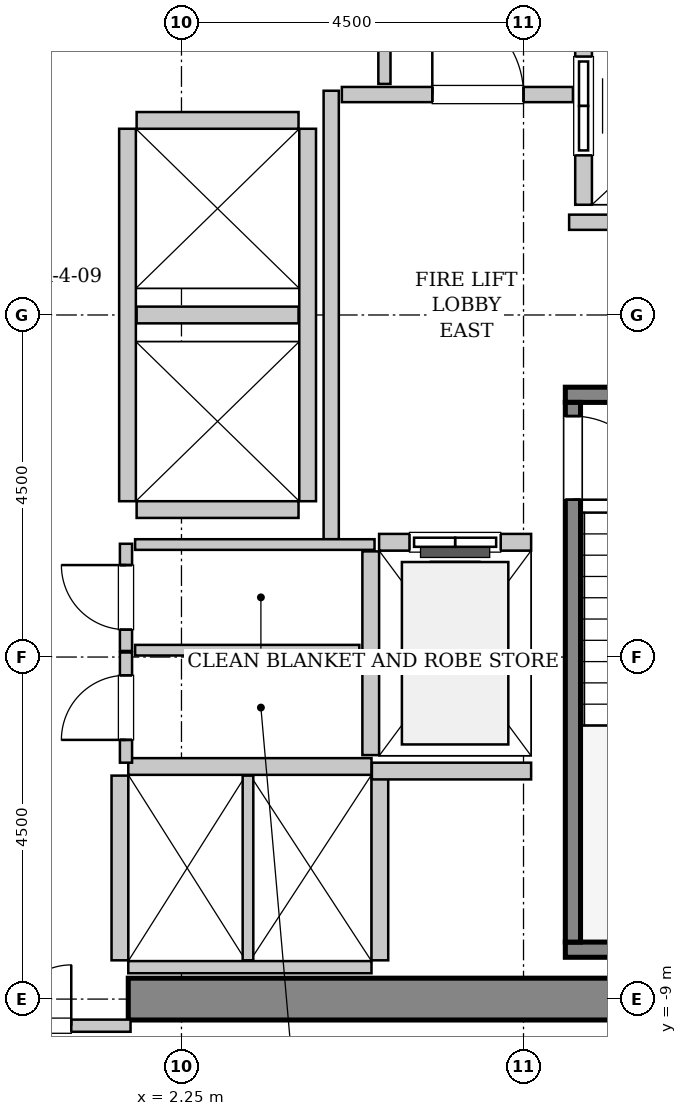
"""IFC4 building model, lengths in metres.
Left out: names, types, materials, properties, quantities, classifications, styles, units other than length and angle.
Written with IfcOpenShell. Run it as: python <this file> out.ifc"""

import sys

from ifc_helpers import new_model, si_unit, direction, frame, frame_2d, origin, place, context, subcontext, project, spatial, rectangle, extrude, source, transform, mapped, element, fill, save


model = new_model("IFC4")
c1 = context("Model", 3, precision=1e-05, world=origin(), true_north=direction((0.0, 1.0)))
c2 = subcontext(c1, "Body", "Model", "MODEL_VIEW")
j1 = project(units=[si_unit("LENGTHUNIT", "METRE"), si_unit("PLANEANGLEUNIT", "RADIAN")], contexts=[c1])
p1 = place(None, origin())
s1 = spatial("IfcSite", under=j1, at=p1, CompositionType="ELEMENT")
p2 = place(p1, origin())
s2 = spatial("IfcBuilding", under=s1, at=p2, CompositionType="ELEMENT")
p3 = place(p2, frame((0.0, 0.0, 121.2)))
s3 = spatial("IfcBuildingStorey", under=s2, at=p3, CompositionType="ELEMENT", Elevation=121.2)
m1 = source(origin(), c2, "Body", "SweptSolid", [
    extrude(rectangle(XDim=9.975, YDim=0.55, at=frame_2d((4.987, 0.0))), origin(), (0.0, 0.0, 1.0), 3.8),
])
p4 = place(p3, frame((1.55, -9.0, 0.0), z_axis=(0.0, 0.0, 1.0), x_axis=(1.0, 0.0, 0.0)))
e1 = element("IfcWall", 1, at=p4, inside=s3, PredefinedType="SHEAR", context=c2, shape_type="MappedRepresentation", body=[
    mapped(m1, transform((0.0, 0.0, 0.0), x_axis=(1.0, 0.0, 0.0), y_axis=(0.0, 1.0, 0.0), z_axis=(0.0, 0.0, 1.0), scale=1.0)),
])
m2 = source(origin(), c2, "Body", "SweptSolid", [
    extrude(rectangle(XDim=3.4, YDim=0.2, at=frame_2d((1.7, 0.0))), origin(), (0.0, 0.0, 1.0), 3.8),
])
p5 = place(p3, frame((7.3, -1.05, 0.0), z_axis=(0.0, 0.0, 1.0), x_axis=(1.0, 0.0, 0.0)))
e2 = element("IfcWall", 2, at=p5, inside=s3, PredefinedType="SOLIDWALL", context=c2, shape_type="MappedRepresentation", body=[
    mapped(m2, transform((0.0, 0.0, 0.0), x_axis=(1.0, 0.0, 0.0), y_axis=(0.0, 1.0, 0.0), z_axis=(0.0, 0.0, 1.0), scale=1.0)),
])
m3 = source(origin(), c2, "Body", "SweptSolid", [
    extrude(rectangle(XDim=3.68, YDim=0.2, at=frame_2d((1.84, 0.0))), origin(), (0.0, 0.0, 1.0), 3.8),
])
p6 = place(p3, frame((7.3, -8.35, 0.0), z_axis=(0.0, 0.0, 1.0), x_axis=(1.0, 0.0, 0.0)))
e3 = element("IfcWall", 3, at=p6, inside=s3, PredefinedType="SOLIDWALL", context=c2, shape_type="MappedRepresentation", body=[
    mapped(m3, transform((0.0, 0.0, 0.0), x_axis=(1.0, 0.0, 0.0), y_axis=(0.0, 1.0, 0.0), z_axis=(0.0, 0.0, 1.0), scale=1.0)),
])
m4 = source(origin(), c2, "Body", "SweptSolid", [
    extrude(rectangle(XDim=7.1, YDim=0.2, at=frame_2d((3.55, 0.0))), origin(), (0.0, 0.0, 1.0), 3.8),
])
p7 = place(p3, frame((7.4, -1.15, 0.0), z_axis=(0.0, 0.0, 1.0), x_axis=(0.0, -1.0, 0.0)))
e4 = element("IfcWall", 4, at=p7, inside=s3, PredefinedType="SOLIDWALL", context=c2, shape_type="MappedRepresentation", body=[
    mapped(m4, transform((0.0, 0.0, 0.0), x_axis=(1.0, 0.0, 0.0), y_axis=(0.0, 1.0, 0.0), z_axis=(0.0, 0.0, 1.0), scale=1.0)),
])
p8 = place(p7, frame((0.18, 0.0, 0.0)))
e5 = element("IfcOpeningElement", 5, at=p8, cuts=e4, PredefinedType="OPENING", context=c2, shape_type="SweptSolid", body=[
    extrude(rectangle(XDim=1.1, YDim=2.15, at=frame_2d((0.55, 1.075))), frame((0.0, 0.11, 0.0), z_axis=(0.0, -1.0, 0.0), x_axis=(1.0, 0.0, 0.0)), (0.0, 0.0, 1.0), 0.22),
])
m5 = source(origin(), c2, "Body", "SweptSolid", [
    extrude(rectangle(XDim=2.0, YDim=0.22, at=frame_2d((1.0, 0.0))), origin(), (0.0, 0.0, 1.0), 3.535),
])
p9 = place(p3, frame((6.85, -2.99, 0.0), z_axis=(0.0, 0.0, 1.0), x_axis=(-1.0, 0.0, 0.0)))
e6 = element("IfcWall", 6, at=p9, inside=s3, PredefinedType="SOLIDWALL", context=c2, shape_type="MappedRepresentation", body=[
    mapped(m5, transform((0.0, 0.0, 0.0), x_axis=(1.0, 0.0, 0.0), y_axis=(0.0, 1.0, 0.0), z_axis=(0.0, 0.0, 1.0), scale=1.0)),
])
p10 = place(p9, frame((0.4, 0.0, 0.0)))
e7 = element("IfcOpeningElement", 7, at=p10, cuts=e6, PredefinedType="OPENING", context=c2, shape_type="SweptSolid", body=[
    extrude(rectangle(XDim=1.2, YDim=2.2, at=frame_2d((0.6, 1.1))), frame((0.0, 0.12, 0.0), z_axis=(0.0, -1.0, 0.0), x_axis=(1.0, 0.0, 0.0)), (0.0, 0.0, 1.0), 0.24),
])
m6 = source(origin(), c2, "Body", "SweptSolid", [
    extrude(rectangle(XDim=2.68, YDim=0.22, at=frame_2d((1.34, 0.0))), origin(), (0.0, 0.0, 1.0), 3.535),
])
p11 = place(p3, frame((4.74, -3.11, 0.0), z_axis=(0.0, 0.0, 1.0), x_axis=(0.0, -1.0, 0.0)))
e8 = element("IfcWall", 8, at=p11, inside=s3, PredefinedType="SOLIDWALL", context=c2, shape_type="MappedRepresentation", body=[
    mapped(m6, transform((0.0, 0.0, 0.0), x_axis=(1.0, 0.0, 0.0), y_axis=(0.0, 1.0, 0.0), z_axis=(0.0, 0.0, 1.0), scale=1.0)),
])
m7 = source(origin(), c2, "Body", "SweptSolid", [
    extrude(rectangle(XDim=5.45, YDim=0.22, at=frame_2d((2.725, 0.0))), origin(), (0.0, 0.0, 1.0), 3.535),
])
p12 = place(p3, frame((7.54, 6.9, 0.0), z_axis=(0.0, 0.0, 1.0), x_axis=(0.0, -1.0, 0.0)))
e9 = element("IfcWall", 9, at=p12, inside=s3, PredefinedType="SOLIDWALL", context=c2, shape_type="MappedRepresentation", body=[
    mapped(m7, transform((0.0, 0.0, 0.0), x_axis=(1.0, 0.0, 0.0), y_axis=(0.0, 1.0, 0.0), z_axis=(0.0, 0.0, 1.0), scale=1.0)),
])
p13 = place(p12, frame((3.5, 0.0, 0.0)))
e10 = element("IfcOpeningElement", 10, at=p13, cuts=e9, PredefinedType="OPENING", context=c2, shape_type="SweptSolid", body=[
    extrude(rectangle(XDim=1.3, YDim=2.3, at=frame_2d((0.65, 1.15))), frame((0.0, 0.12, 0.0), z_axis=(0.0, -1.0, 0.0), x_axis=(1.0, 0.0, 0.0)), (0.0, 0.0, 1.0), 0.24),
])
p14 = place(p12, frame((0.65, 0.0, 0.0)))
e11 = element("IfcOpeningElement", 11, at=p14, cuts=e9, PredefinedType="OPENING", context=c2, shape_type="SweptSolid", body=[
    extrude(rectangle(XDim=1.3, YDim=2.3, at=frame_2d((0.65, 1.15))), frame((0.0, 0.12, 0.0), z_axis=(0.0, -1.0, 0.0), x_axis=(1.0, 0.0, 0.0)), (0.0, 0.0, 1.0), 0.24),
])
m8 = source(origin(), c2, "Body", "SweptSolid", [
    extrude(rectangle(XDim=3.2, YDim=0.22, at=frame_2d((1.6, 0.0))), origin(), (0.0, 0.0, 1.0), 3.535),
])
p15 = place(p3, frame((4.75, -5.94, 0.0), z_axis=(0.0, 0.0, 1.0), x_axis=(-1.0, 0.0, 0.0)))
e12 = element("IfcWall", 12, at=p15, inside=s3, PredefinedType="SOLIDWALL", context=c2, shape_type="MappedRepresentation", body=[
    mapped(m8, transform((0.0, 0.0, 0.0), x_axis=(1.0, 0.0, 0.0), y_axis=(0.0, 1.0, 0.0), z_axis=(0.0, 0.0, 1.0), scale=1.0)),
])
m9 = source(origin(), c2, "Body", "SweptSolid", [
    extrude(rectangle(XDim=3.2, YDim=0.16, at=frame_2d((1.6, 0.0))), origin(), (0.0, 0.0, 1.0), 2.425),
])
p16 = place(p3, frame((1.55, -8.58, 0.0), z_axis=(0.0, 0.0, 1.0), x_axis=(1.0, 0.0, 0.0)))
e13 = element("IfcWall", 13, at=p16, inside=s3, PredefinedType="PARTITIONING", context=c2, shape_type="MappedRepresentation", body=[
    mapped(m9, transform((0.0, 0.0, 0.0), x_axis=(1.0, 0.0, 0.0), y_axis=(0.0, 1.0, 0.0), z_axis=(0.0, 0.0, 1.0), scale=1.0)),
])
m10 = source(origin(), c2, "Body", "SweptSolid", [
    extrude(rectangle(XDim=2.43, YDim=0.22, at=frame_2d((1.215, 0.0))), origin(), (0.0, 0.0, 1.0), 3.535),
])
p17 = place(p3, frame((1.44, -6.06, 0.0), z_axis=(0.0, 0.0, 1.0), x_axis=(0.0, -1.0, 0.0)))
e14 = element("IfcWall", 14, at=p17, inside=s3, PredefinedType="SOLIDWALL", context=c2, shape_type="MappedRepresentation", body=[
    mapped(m10, transform((0.0, 0.0, 0.0), x_axis=(1.0, 0.0, 0.0), y_axis=(0.0, 1.0, 0.0), z_axis=(0.0, 0.0, 1.0), scale=1.0)),
])
m11 = source(origin(), c2, "Body", "SweptSolid", [
    extrude(rectangle(XDim=2.43, YDim=0.14, at=frame_2d((1.215, 0.0))), origin(), (0.0, 0.0, 1.0), 3.535),
])
p18 = place(p3, frame((3.125, -8.49, 0.0), z_axis=(0.0, 0.0, 1.0), x_axis=(0.0, 1.0, 0.0)))
e15 = element("IfcWall", 15, at=p18, inside=s3, PredefinedType="PARTITIONING", context=c2, shape_type="MappedRepresentation", body=[
    mapped(m11, transform((0.0, 0.0, 0.0), x_axis=(1.0, 0.0, 0.0), y_axis=(0.0, 1.0, 0.0), z_axis=(0.0, 0.0, 1.0), scale=1.0)),
])
p19 = place(p3, frame((4.86, -8.49, 0.0), z_axis=(0.0, 0.0, 1.0), x_axis=(0.0, 1.0, 0.0)))
e16 = element("IfcWall", 16, at=p19, inside=s3, PredefinedType="SOLIDWALL", context=c2, shape_type="MappedRepresentation", body=[
    mapped(m10, transform((0.0, 0.0, 0.0), x_axis=(1.0, 0.0, 0.0), y_axis=(0.0, 1.0, 0.0), z_axis=(0.0, 0.0, 1.0), scale=1.0)),
])
m12 = source(origin(), c2, "Body", "SweptSolid", [
    extrude(rectangle(XDim=4.9, YDim=0.22, at=frame_2d((2.45, 0.0))), origin(), (0.0, 0.0, 1.0), 3.535),
])
for number, where, z_axis, x_axis in (
    (17, (1.54, 2.45, 0.0), (0.0, 0.0, 1.0), (0.0, -1.0, 0.0)),
    (18, (3.91, -2.45, 0.0), (0.0, 0.0, 1.0), (0.0, 1.0, 0.0)),
):
    element("IfcWall", number, at=place(p3, frame(where, z_axis=z_axis, x_axis=x_axis)), inside=s3, PredefinedType="SOLIDWALL", context=c2, shape_type="MappedRepresentation", body=[
        mapped(m12, transform((0.0, 0.0, 0.0), x_axis=(1.0, 0.0, 0.0), y_axis=(0.0, 1.0, 0.0), z_axis=(0.0, 0.0, 1.0), scale=1.0)),
    ])
m13 = source(origin(), c2, "Body", "SweptSolid", [
    extrude(rectangle(XDim=2.13, YDim=0.22, at=frame_2d((1.065, 0.0))), origin(), (0.0, 0.0, 1.0), 3.535),
])
for number, where, z_axis, x_axis in (
    (19, (1.66, -2.56, 0.0), (0.0, 0.0, 1.0), (1.0, 0.0, 0.0)),
    (20, (1.66, 0.0, 0.0), (0.0, 0.0, 1.0), (1.0, 0.0, 0.0)),
    (21, (3.79, 2.56, 0.0), (0.0, 0.0, 1.0), (-1.0, 0.0, 0.0)),
):
    element("IfcWall", number, at=place(p3, frame(where, z_axis=z_axis, x_axis=x_axis)), inside=s3, PredefinedType="SOLIDWALL", context=c2, shape_type="MappedRepresentation", body=[
        mapped(m13, transform((0.0, 0.0, 0.0), x_axis=(1.0, 0.0, 0.0), y_axis=(0.0, 1.0, 0.0), z_axis=(0.0, 0.0, 1.0), scale=1.0)),
    ])
m14 = source(origin(), c2, "Body", "SweptSolid", [
    extrude(rectangle(XDim=2.095, YDim=0.22, at=frame_2d((1.048, 0.0))), origin(), (0.0, 0.0, 1.0), 3.535),
])
p20 = place(p3, frame((4.755, -6.0, 0.0), z_axis=(0.0, 0.0, 1.0), x_axis=(1.0, 0.0, 0.0)))
e22 = element("IfcWall", 22, at=p20, inside=s3, PredefinedType="SOLIDWALL", context=c2, shape_type="MappedRepresentation", body=[
    mapped(m14, transform((0.0, 0.0, 0.0), x_axis=(1.0, 0.0, 0.0), y_axis=(0.0, 1.0, 0.0), z_axis=(0.0, 0.0, 1.0), scale=1.0)),
])
m15 = source(origin(), c2, "Body", "SweptSolid", [
    extrude(rectangle(XDim=5.9, YDim=0.2, at=frame_2d((2.95, 0.0))), origin(), (0.0, 0.0, 1.0), 3.535),
])
p21 = place(p3, frame((4.22, -2.95, 0.0), z_axis=(0.0, 0.0, 1.0), x_axis=(0.0, 1.0, 0.0)))
e23 = element("IfcWall", 23, at=p21, inside=s3, PredefinedType="PARTITIONING", context=c2, shape_type="MappedRepresentation", body=[
    mapped(m15, transform((0.0, 0.0, 0.0), x_axis=(1.0, 0.0, 0.0), y_axis=(0.0, 1.0, 0.0), z_axis=(0.0, 0.0, 1.0), scale=1.0)),
])
m16 = source(origin(), c2, "Body", "SweptSolid", [
    extrude(rectangle(XDim=3.04, YDim=0.2, at=frame_2d((1.52, 0.0))), origin(), (0.0, 0.0, 1.0), 3.535),
])
p22 = place(p3, frame((4.36, 2.9, 0.0), z_axis=(0.0, 0.0, 1.0), x_axis=(1.0, 0.0, 0.0)))
e24 = element("IfcWall", 24, at=p22, inside=s3, PredefinedType="PARTITIONING", context=c2, shape_type="MappedRepresentation", body=[
    mapped(m16, transform((0.0, 0.0, 0.0), x_axis=(1.0, 0.0, 0.0), y_axis=(0.0, 1.0, 0.0), z_axis=(0.0, 0.0, 1.0), scale=1.0)),
])
p23 = place(p22, frame((1.19, 0.0, 0.0)))
e25 = element("IfcOpeningElement", 25, at=p23, cuts=e24, PredefinedType="OPENING", context=c2, shape_type="SweptSolid", body=[
    extrude(rectangle(XDim=1.2, YDim=2.15, at=frame_2d((0.6, 1.075))), frame((0.0, 0.11, 0.0), z_axis=(0.0, -1.0, 0.0), x_axis=(1.0, 0.0, 0.0)), (0.0, 0.0, 1.0), 0.22),
])
m17 = source(origin(), c2, "Body", "SweptSolid", [
    extrude(rectangle(XDim=4.11, YDim=0.2, at=frame_2d((2.055, 0.0))), origin(), (0.0, 0.0, 1.0), 3.535),
])
p24 = place(p3, frame((7.35, 1.22, 0.0), z_axis=(0.0, 0.0, 1.0), x_axis=(1.0, 0.0, 0.0)))
e26 = element("IfcWall", 26, at=p24, inside=s3, PredefinedType="PARTITIONING", context=c2, shape_type="MappedRepresentation", body=[
    mapped(m17, transform((0.0, 0.0, 0.0), x_axis=(1.0, 0.0, 0.0), y_axis=(0.0, 1.0, 0.0), z_axis=(0.0, 0.0, 1.0), scale=1.0)),
])
m18 = source(origin(), c2, "Body", "SweptSolid", [
    extrude(rectangle(XDim=3.16, YDim=0.16, at=frame_2d((1.58, 0.0))), origin(), (0.0, 0.0, 1.0), 2.425),
])
p25 = place(p3, frame((-1.58, -9.35, 0.0), z_axis=(0.0, 0.0, 1.0), x_axis=(1.0, 0.0, 0.0)))
e27 = element("IfcWall", 27, at=p25, inside=s3, PredefinedType="PARTITIONING", context=c2, shape_type="MappedRepresentation", body=[
    mapped(m18, transform((0.0, 0.0, 0.0), x_axis=(1.0, 0.0, 0.0), y_axis=(0.0, 1.0, 0.0), z_axis=(0.0, 0.0, 1.0), scale=1.0)),
])
p26 = place(p25, frame((0.78, 0.0, 0.0)))
e28 = element("IfcOpeningElement", 28, at=p26, cuts=e27, PredefinedType="OPENING", context=c2, shape_type="SweptSolid", body=[
    extrude(rectangle(XDim=1.6, YDim=2.3, at=frame_2d((0.8, 1.15))), frame((0.0, 0.09, 0.0), z_axis=(0.0, -1.0, 0.0), x_axis=(1.0, 0.0, 0.0)), (0.0, 0.0, 1.0), 0.18),
])
m19 = source(origin(), c2, "Body", "SweptSolid", [
    extrude(rectangle(XDim=3.015, YDim=0.16, at=frame_2d((1.507, 0.0))), origin(), (0.0, 0.0, 1.0), 3.535),
])
p27 = place(p3, frame((4.92, 3.04, 0.0), z_axis=(0.0, 0.0, 1.0), x_axis=(0.0, 1.0, 0.0)))
e29 = element("IfcWall", 29, at=p27, inside=s3, PredefinedType="PARTITIONING", context=c2, shape_type="MappedRepresentation", body=[
    mapped(m19, transform((0.0, 0.0, 0.0), x_axis=(1.0, 0.0, 0.0), y_axis=(0.0, 1.0, 0.0), z_axis=(0.0, 0.0, 1.0), scale=1.0)),
])
m20 = source(origin(), c2, "Body", "SweptSolid", [
    extrude(rectangle(XDim=1.41, YDim=0.16, at=frame_2d((0.705, 0.0))), origin(), (0.0, 0.0, 1.0), 3.535),
])
p28 = place(p3, frame((1.52, -4.42, 0.0), z_axis=(0.0, 0.0, 1.0), x_axis=(0.0, 1.0, 0.0)))
e30 = element("IfcWall", 30, at=p28, inside=s3, PredefinedType="PARTITIONING", context=c2, shape_type="MappedRepresentation", body=[
    mapped(m20, transform((0.0, 0.0, 0.0), x_axis=(1.0, 0.0, 0.0), y_axis=(0.0, 1.0, 0.0), z_axis=(0.0, 0.0, 1.0), scale=1.0)),
])
p29 = place(p28, frame((0.28, 0.0, 0.0)))
e31 = element("IfcOpeningElement", 31, at=p29, cuts=e30, PredefinedType="OPENING", context=c2, shape_type="SweptSolid", body=[
    extrude(rectangle(XDim=0.85, YDim=2.1, at=frame_2d((0.425, 1.05))), frame((0.0, 0.09, 0.0), z_axis=(0.0, -1.0, 0.0), x_axis=(1.0, 0.0, 0.0)), (0.0, 0.0, 1.0), 0.18),
])
m21 = source(origin(), c2, "Body", "SweptSolid", [
    extrude(rectangle(XDim=3.15, YDim=0.14, at=frame_2d((1.575, 0.0))), origin(), (0.0, 0.0, 1.0), 3.535),
])
p30 = place(p3, frame((1.64, -3.02, 0.0), z_axis=(0.0, 0.0, 1.0), x_axis=(1.0, 0.0, 0.0)))
e32 = element("IfcWall", 32, at=p30, inside=s3, PredefinedType="PARTITIONING", context=c2, shape_type="MappedRepresentation", body=[
    mapped(m21, transform((0.0, 0.0, 0.0), x_axis=(1.0, 0.0, 0.0), y_axis=(0.0, 1.0, 0.0), z_axis=(0.0, 0.0, 1.0), scale=1.0)),
])
m22 = source(origin(), c2, "Body", "SweptSolid", [
    extrude(rectangle(XDim=2.95, YDim=0.14, at=frame_2d((1.475, 0.0))), origin(), (0.0, 0.0, 1.0), 3.535),
])
p31 = place(p3, frame((1.64, -4.41, 0.0), z_axis=(0.0, 0.0, 1.0), x_axis=(1.0, 0.0, 0.0)))
e33 = element("IfcWall", 33, at=p31, inside=s3, PredefinedType="PARTITIONING", context=c2, shape_type="MappedRepresentation", body=[
    mapped(m22, transform((0.0, 0.0, 0.0), x_axis=(1.0, 0.0, 0.0), y_axis=(0.0, 1.0, 0.0), z_axis=(0.0, 0.0, 1.0), scale=1.0)),
])
m23 = source(origin(), c2, "Body", "SweptSolid", [
    extrude(rectangle(XDim=1.45, YDim=0.16, at=frame_2d((0.725, 0.0))), origin(), (0.0, 0.0, 1.0), 3.535),
])
p32 = place(p3, frame((1.52, -5.89, 0.0), z_axis=(0.0, 0.0, 1.0), x_axis=(0.0, 1.0, 0.0)))
e34 = element("IfcWall", 34, at=p32, inside=s3, PredefinedType="PARTITIONING", context=c2, shape_type="MappedRepresentation", body=[
    mapped(m23, transform((0.0, 0.0, 0.0), x_axis=(1.0, 0.0, 0.0), y_axis=(0.0, 1.0, 0.0), z_axis=(0.0, 0.0, 1.0), scale=1.0)),
])
p33 = place(p32, frame((0.3, 0.0, 0.0)))
e35 = element("IfcOpeningElement", 35, at=p33, cuts=e34, PredefinedType="OPENING", context=c2, shape_type="SweptSolid", body=[
    extrude(rectangle(XDim=0.85, YDim=2.1, at=frame_2d((0.425, 1.05))), frame((0.0, 0.09, 0.0), z_axis=(0.0, -1.0, 0.0), x_axis=(1.0, 0.0, 0.0)), (0.0, 0.0, 1.0), 0.18),
])
m24 = source(origin(), c2, "Body", "SweptSolid", [
    extrude(rectangle(XDim=1.1, YDim=2.15, at=frame_2d((0.55, 1.075))), frame((0.0, 0.025, 0.0), z_axis=(0.0, -1.0, 0.0), x_axis=(1.0, 0.0, 0.0)), (0.0, 0.0, 1.0), 0.05),
])
p34 = place(p8, origin())
e36 = element("IfcDoor", 36, at=p34, inside=s3, OperationType="SINGLE_SWING_RIGHT", PredefinedType="DOOR", context=c2, shape_type="MappedRepresentation", body=[
    mapped(m24, transform((0.0, 0.0, 0.0), x_axis=(1.0, 0.0, 0.0), y_axis=(0.0, 1.0, 0.0), z_axis=(0.0, 0.0, 1.0), scale=1.0)),
])
fill(e5, e36)
m25 = source(origin(), c2, "Body", "SweptSolid", [
    extrude(rectangle(XDim=1.2, YDim=2.2, at=frame_2d((0.6, 1.1))), frame((0.0, 0.025, 0.0), z_axis=(0.0, -1.0, 0.0), x_axis=(1.0, 0.0, 0.0)), (0.0, 0.0, 1.0), 0.05),
])
p35 = place(p10, origin())
e37 = element("IfcDoor", 37, at=p35, inside=s3, OperationType="SLIDING_TO_LEFT", PredefinedType="DOOR", context=c2, shape_type="MappedRepresentation", body=[
    mapped(m25, transform((0.0, 0.0, 0.0), x_axis=(1.0, 0.0, 0.0), y_axis=(0.0, 1.0, 0.0), z_axis=(0.0, 0.0, 1.0), scale=1.0)),
])
fill(e7, e37)
m26 = source(origin(), c2, "Body", "SweptSolid", [
    extrude(rectangle(XDim=1.3, YDim=2.3, at=frame_2d((0.65, 1.15))), frame((0.0, 0.025, 0.0), z_axis=(0.0, -1.0, 0.0), x_axis=(1.0, 0.0, 0.0)), (0.0, 0.0, 1.0), 0.05),
])
p36 = place(p13, origin())
e38 = element("IfcDoor", 38, at=p36, inside=s3, OperationType="SLIDING_TO_RIGHT", PredefinedType="DOOR", context=c2, shape_type="MappedRepresentation", body=[
    mapped(m26, transform((0.0, 0.0, 0.0), x_axis=(1.0, 0.0, 0.0), y_axis=(0.0, 1.0, 0.0), z_axis=(0.0, 0.0, 1.0), scale=1.0)),
])
fill(e10, e38)
m27 = source(origin(), c2, "Body", "SweptSolid", [
    extrude(rectangle(XDim=1.2, YDim=2.15, at=frame_2d((0.6, 1.075))), frame((0.0, 0.025, 0.0), z_axis=(0.0, -1.0, 0.0), x_axis=(1.0, 0.0, 0.0)), (0.0, 0.0, 1.0), 0.05),
])
p37 = place(p23, origin())
e39 = element("IfcDoor", 39, at=p37, inside=s3, OperationType="SINGLE_SWING_LEFT", PredefinedType="DOOR", context=c2, shape_type="MappedRepresentation", body=[
    mapped(m27, transform((0.0, 0.0, 0.0), x_axis=(1.0, 0.0, 0.0), y_axis=(0.0, 1.0, 0.0), z_axis=(0.0, 0.0, 1.0), scale=1.0)),
])
fill(e25, e39)
m28 = source(origin(), c2, "Body", "SweptSolid", [
    extrude(rectangle(XDim=1.6, YDim=2.3, at=frame_2d((0.8, 1.15))), frame((0.0, 0.025, 0.0), z_axis=(0.0, -1.0, 0.0), x_axis=(1.0, 0.0, 0.0)), (0.0, 0.0, 1.0), 0.05),
])
p38 = place(p26, origin())
e40 = element("IfcDoor", 40, at=p38, inside=s3, OperationType="DOUBLE_DOOR_SINGLE_SWING", PredefinedType="DOOR", context=c2, shape_type="MappedRepresentation", body=[
    mapped(m28, transform((0.0, 0.0, 0.0), x_axis=(1.0, 0.0, 0.0), y_axis=(0.0, 1.0, 0.0), z_axis=(0.0, 0.0, 1.0), scale=1.0)),
])
fill(e28, e40)
m29 = source(origin(), c2, "Body", "SweptSolid", [
    extrude(rectangle(XDim=0.85, YDim=2.1, at=frame_2d((0.425, 1.05))), frame((0.0, 0.025, 0.0), z_axis=(0.0, -1.0, 0.0), x_axis=(1.0, 0.0, 0.0)), (0.0, 0.0, 1.0), 0.05),
])
p39 = place(p29, origin())
e41 = element("IfcDoor", 41, at=p39, inside=s3, OperationType="SINGLE_SWING_RIGHT", PredefinedType="DOOR", context=c2, shape_type="MappedRepresentation", body=[
    mapped(m29, transform((0.0, 0.0, 0.0), x_axis=(1.0, 0.0, 0.0), y_axis=(0.0, 1.0, 0.0), z_axis=(0.0, 0.0, 1.0), scale=1.0)),
])
fill(e31, e41)
p40 = place(p33, origin())
e42 = element("IfcDoor", 42, at=p40, inside=s3, OperationType="SINGLE_SWING_LEFT", PredefinedType="DOOR", context=c2, shape_type="MappedRepresentation", body=[
    mapped(m29, transform((0.0, 0.0, 0.0), x_axis=(1.0, 0.0, 0.0), y_axis=(0.0, 1.0, 0.0), z_axis=(0.0, 0.0, 1.0), scale=1.0)),
])
fill(e35, e42)
save(model, sys.argv[1])
